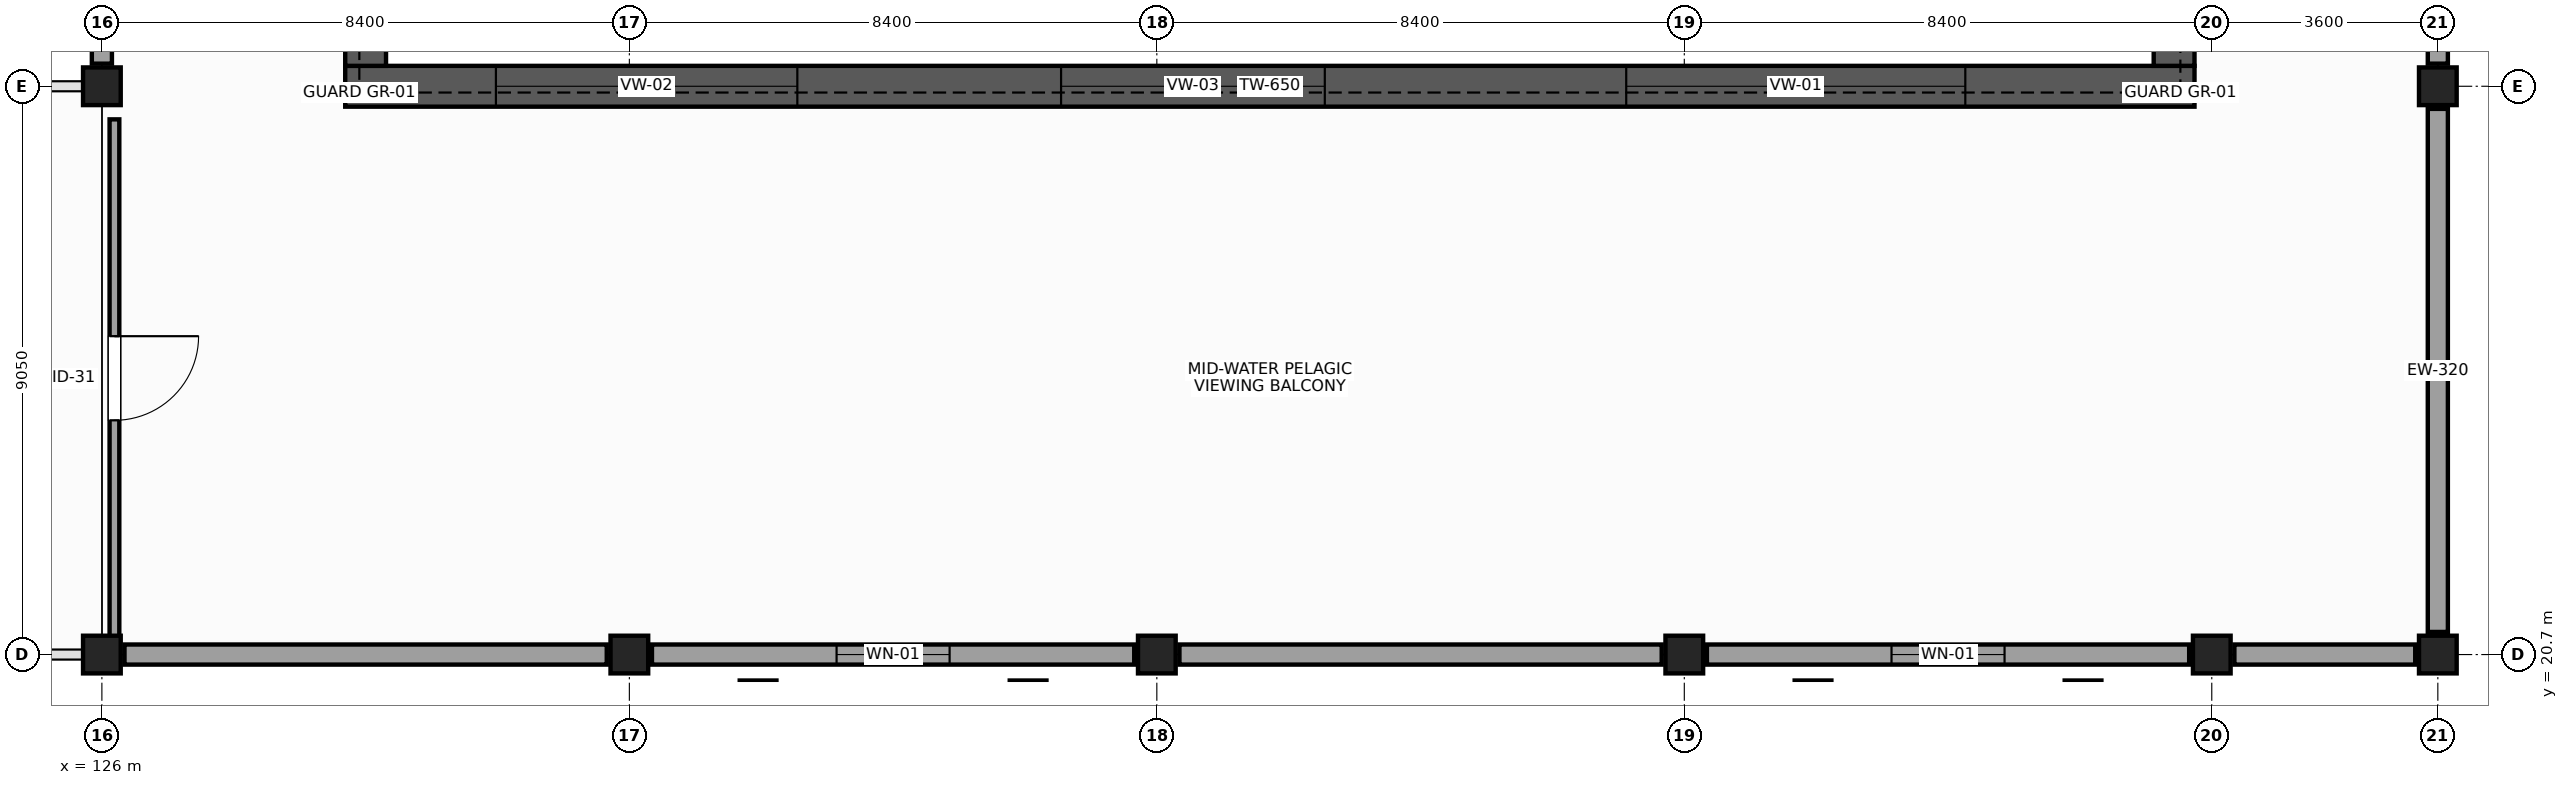
"""IFC4 building model, lengths in metres.
Left out: names, types, materials, properties, quantities, classifications, styles, units other than length and angle.
Written with IfcOpenShell. Run it as: python <this file> out.ifc"""

import sys

from ifc_helpers import new_model, si_unit, direction, frame, frame_2d, origin, origin_2d, place, context, subcontext, project, spatial, rectangle, extrude, element, fill, save


model = new_model("IFC4")
c1 = context("Model", 3, precision=1e-05, world=origin(), true_north=direction((0.0, 1.0)))
c2 = subcontext(c1, "Body", "Model", "MODEL_VIEW")
j1 = project(units=[si_unit("LENGTHUNIT", "METRE"), si_unit("PLANEANGLEUNIT", "RADIAN")], contexts=[c1])
p1 = place(None, origin())
s1 = spatial("IfcSite", under=j1, at=p1, CompositionType="ELEMENT")
p2 = place(p1, origin())
s2 = spatial("IfcBuilding", under=s1, at=p2, CompositionType="ELEMENT")
p3 = place(p2, frame((0.0, 0.0, 5.4)))
s3 = spatial("IfcBuildingStorey", under=s2, at=p3, CompositionType="ELEMENT", Elevation=5.4)
for number, where, z_axis, x_axis in (
    (1, (126.0, 20.7, 0.0), (0.0, 0.0, 1.0), (1.0, 0.0, 0.0)),
    (2, (126.0, 29.75, 0.0), (0.0, 0.0, 1.0), (1.0, 0.0, 0.0)),
    (3, (134.4, 20.7, 0.0), (0.0, 0.0, 1.0), (1.0, 0.0, 0.0)),
    (4, (142.8, 20.7, 0.0), (0.0, 0.0, 1.0), (1.0, 0.0, 0.0)),
    (5, (151.2, 20.7, 0.0), (0.0, 0.0, 1.0), (1.0, 0.0, 0.0)),
    (6, (159.6, 20.7, 0.0), (0.0, 0.0, 1.0), (1.0, 0.0, 0.0)),
    (7, (163.2, 20.7, 0.0), (0.0, 0.0, 1.0), (1.0, 0.0, 0.0)),
    (8, (163.2, 29.75, 0.0), (0.0, 0.0, 1.0), (1.0, 0.0, 0.0)),
):
    element("IfcColumn", number, at=place(p3, frame(where, z_axis=z_axis, x_axis=x_axis)), inside=s3, PredefinedType="COLUMN", context=c2, shape_type="SweptSolid", body=[
        extrude(rectangle(XDim=0.6, YDim=0.6, at=origin_2d()), origin(), (0.0, 0.0, 1.0), 5.4),
    ])
p4 = place(p3, frame((129.875, 29.75, 0.0), z_axis=(0.0, 0.0, 1.0), x_axis=(1.0, 0.0, 0.0)))
e9 = element("IfcWall", 9, at=p4, inside=s3, PredefinedType="SOLIDWALL", context=c2, shape_type="SweptSolid", body=[
    extrude(rectangle(XDim=29.45, YDim=0.65, at=frame_2d((14.725, 0.0))), origin(), (0.0, 0.0, 1.0), 5.1),
])
p5 = place(p4, frame((2.4, 0.0, 0.7)))
e10 = element("IfcOpeningElement", 10, at=p5, cuts=e9, PredefinedType="OPENING", context=c2, shape_type="SweptSolid", body=[
    extrude(rectangle(XDim=4.8, YDim=3.4, at=frame_2d((2.4, 1.7))), frame((0.0, 0.335, 0.0), z_axis=(0.0, -1.0, 0.0), x_axis=(1.0, 0.0, 0.0)), (0.0, 0.0, 1.0), 0.67),
])
p6 = place(p4, frame((11.4, 0.0, 0.7)))
e11 = element("IfcOpeningElement", 11, at=p6, cuts=e9, PredefinedType="OPENING", context=c2, shape_type="SweptSolid", body=[
    extrude(rectangle(XDim=4.2, YDim=3.2, at=frame_2d((2.1, 1.6))), frame((0.0, 0.335, 0.0), z_axis=(0.0, -1.0, 0.0), x_axis=(1.0, 0.0, 0.0)), (0.0, 0.0, 1.0), 0.67),
])
p7 = place(p4, frame((20.4, 0.0, 0.7)))
e12 = element("IfcOpeningElement", 12, at=p7, cuts=e9, PredefinedType="OPENING", context=c2, shape_type="SweptSolid", body=[
    extrude(rectangle(XDim=5.4, YDim=3.6, at=frame_2d((2.7, 1.8))), frame((0.0, 0.335, 0.0), z_axis=(0.0, -1.0, 0.0), x_axis=(1.0, 0.0, 0.0)), (0.0, 0.0, 1.0), 0.67),
])
p8 = place(p3, frame((130.2, 30.075, 0.0), z_axis=(0.0, 0.0, 1.0), x_axis=(0.0, 1.0, 0.0)))
e13 = element("IfcWall", 13, at=p8, inside=s3, PredefinedType="SOLIDWALL", context=c2, shape_type="SweptSolid", body=[
    extrude(rectangle(XDim=35.55, YDim=0.65, at=frame_2d((17.775, 0.0))), origin(), (0.0, 0.0, 1.0), 5.1),
])
p9 = place(p8, frame((2.4, 0.0, 0.7)))
e14 = element("IfcOpeningElement", 14, at=p9, cuts=e13, PredefinedType="OPENING", context=c2, shape_type="SweptSolid", body=[
    extrude(rectangle(XDim=4.8, YDim=3.4, at=frame_2d((2.4, 1.7))), frame((0.0, 0.335, 0.0), z_axis=(0.0, -1.0, 0.0), x_axis=(1.0, 0.0, 0.0)), (0.0, 0.0, 1.0), 0.67),
])
p10 = place(p8, frame((11.4, 0.0, 0.7)))
e15 = element("IfcOpeningElement", 15, at=p10, cuts=e13, PredefinedType="OPENING", context=c2, shape_type="SweptSolid", body=[
    extrude(rectangle(XDim=4.2, YDim=3.2, at=frame_2d((2.1, 1.6))), frame((0.0, 0.335, 0.0), z_axis=(0.0, -1.0, 0.0), x_axis=(1.0, 0.0, 0.0)), (0.0, 0.0, 1.0), 0.67),
])
p11 = place(p8, frame((20.4, 0.0, 0.7)))
e16 = element("IfcOpeningElement", 16, at=p11, cuts=e13, PredefinedType="OPENING", context=c2, shape_type="SweptSolid", body=[
    extrude(rectangle(XDim=5.4, YDim=3.6, at=frame_2d((2.7, 1.8))), frame((0.0, 0.335, 0.0), z_axis=(0.0, -1.0, 0.0), x_axis=(1.0, 0.0, 0.0)), (0.0, 0.0, 1.0), 0.67),
])
p12 = place(p3, frame((159.0, 30.075, 0.0), z_axis=(0.0, 0.0, 1.0), x_axis=(0.0, 1.0, 0.0)))
e17 = element("IfcWall", 17, at=p12, inside=s3, PredefinedType="SOLIDWALL", context=c2, shape_type="SweptSolid", body=[
    extrude(rectangle(XDim=35.55, YDim=0.65, at=frame_2d((17.775, 0.0))), origin(), (0.0, 0.0, 1.0), 5.1),
])
p13 = place(p12, frame((2.4, 0.0, 0.7)))
e18 = element("IfcOpeningElement", 18, at=p13, cuts=e17, PredefinedType="OPENING", context=c2, shape_type="SweptSolid", body=[
    extrude(rectangle(XDim=4.8, YDim=3.4, at=frame_2d((2.4, 1.7))), frame((0.0, 0.335, 0.0), z_axis=(0.0, -1.0, 0.0), x_axis=(1.0, 0.0, 0.0)), (0.0, 0.0, 1.0), 0.67),
])
p14 = place(p12, frame((11.4, 0.0, 0.7)))
e19 = element("IfcOpeningElement", 19, at=p14, cuts=e17, PredefinedType="OPENING", context=c2, shape_type="SweptSolid", body=[
    extrude(rectangle(XDim=4.2, YDim=3.2, at=frame_2d((2.1, 1.6))), frame((0.0, 0.335, 0.0), z_axis=(0.0, -1.0, 0.0), x_axis=(1.0, 0.0, 0.0)), (0.0, 0.0, 1.0), 0.67),
])
p15 = place(p12, frame((20.4, 0.0, 0.7)))
e20 = element("IfcOpeningElement", 20, at=p15, cuts=e17, PredefinedType="OPENING", context=c2, shape_type="SweptSolid", body=[
    extrude(rectangle(XDim=5.4, YDim=3.6, at=frame_2d((2.7, 1.8))), frame((0.0, 0.335, 0.0), z_axis=(0.0, -1.0, 0.0), x_axis=(1.0, 0.0, 0.0)), (0.0, 0.0, 1.0), 0.67),
])
p16 = place(p3, frame((163.2, 21.06, 0.0), z_axis=(0.0, 0.0, 1.0), x_axis=(0.0, 1.0, 0.0)))
e21 = element("IfcWall", 21, at=p16, inside=s3, PredefinedType="STANDARD", context=c2, shape_type="SweptSolid", body=[
    extrude(rectangle(XDim=8.33, YDim=0.32, at=frame_2d((4.165, 0.0))), origin(), (0.0, 0.0, 1.0), 4.55),
])
p17 = place(p3, frame((163.2, 30.11, 0.0), z_axis=(0.0, 0.0, 1.0), x_axis=(0.0, 1.0, 0.0)))
e22 = element("IfcWall", 22, at=p17, inside=s3, PredefinedType="STANDARD", context=c2, shape_type="SweptSolid", body=[
    extrude(rectangle(XDim=8.33, YDim=0.32, at=frame_2d((4.165, 0.0))), origin(), (0.0, 0.0, 1.0), 4.55),
])
p18 = place(p17, frame((3.265, 0.0, 1.05)))
e23 = element("IfcOpeningElement", 23, at=p18, cuts=e22, PredefinedType="OPENING", context=c2, shape_type="SweptSolid", body=[
    extrude(rectangle(XDim=1.8, YDim=2.4, at=frame_2d((0.9, 1.2))), frame((0.0, 0.17, 0.0), z_axis=(0.0, -1.0, 0.0), x_axis=(1.0, 0.0, 0.0)), (0.0, 0.0, 1.0), 0.34),
])
p19 = place(p3, frame((126.36, 20.7, 0.0), z_axis=(0.0, 0.0, 1.0), x_axis=(1.0, 0.0, 0.0)))
e24 = element("IfcWall", 24, at=p19, inside=s3, PredefinedType="STANDARD", context=c2, shape_type="SweptSolid", body=[
    extrude(rectangle(XDim=7.68, YDim=0.32, at=frame_2d((3.84, 0.0))), origin(), (0.0, 0.0, 1.0), 4.23),
])
p20 = place(p3, frame((134.76, 20.7, 0.0), z_axis=(0.0, 0.0, 1.0), x_axis=(1.0, 0.0, 0.0)))
e25 = element("IfcWall", 25, at=p20, inside=s3, PredefinedType="STANDARD", context=c2, shape_type="SweptSolid", body=[
    extrude(rectangle(XDim=7.68, YDim=0.32, at=frame_2d((3.84, 0.0))), origin(), (0.0, 0.0, 1.0), 4.55),
])
p21 = place(p20, frame((2.94, 0.0, 1.05)))
e26 = element("IfcOpeningElement", 26, at=p21, cuts=e25, PredefinedType="OPENING", context=c2, shape_type="SweptSolid", body=[
    extrude(rectangle(XDim=1.8, YDim=2.4, at=frame_2d((0.9, 1.2))), frame((0.0, 0.17, 0.0), z_axis=(0.0, -1.0, 0.0), x_axis=(1.0, 0.0, 0.0)), (0.0, 0.0, 1.0), 0.34),
])
p22 = place(p3, frame((143.16, 20.7, 0.0), z_axis=(0.0, 0.0, 1.0), x_axis=(1.0, 0.0, 0.0)))
e27 = element("IfcWall", 27, at=p22, inside=s3, PredefinedType="STANDARD", context=c2, shape_type="SweptSolid", body=[
    extrude(rectangle(XDim=7.68, YDim=0.32, at=frame_2d((3.84, 0.0))), origin(), (0.0, 0.0, 1.0), 4.55),
])
p23 = place(p3, frame((151.56, 20.7, 0.0), z_axis=(0.0, 0.0, 1.0), x_axis=(1.0, 0.0, 0.0)))
e28 = element("IfcWall", 28, at=p23, inside=s3, PredefinedType="STANDARD", context=c2, shape_type="SweptSolid", body=[
    extrude(rectangle(XDim=7.68, YDim=0.32, at=frame_2d((3.84, 0.0))), origin(), (0.0, 0.0, 1.0), 4.55),
])
p24 = place(p23, frame((2.94, 0.0, 1.05)))
e29 = element("IfcOpeningElement", 29, at=p24, cuts=e28, PredefinedType="OPENING", context=c2, shape_type="SweptSolid", body=[
    extrude(rectangle(XDim=1.8, YDim=2.4, at=frame_2d((0.9, 1.2))), frame((0.0, 0.17, 0.0), z_axis=(0.0, -1.0, 0.0), x_axis=(1.0, 0.0, 0.0)), (0.0, 0.0, 1.0), 0.34),
])
p25 = place(p3, frame((159.96, 20.7, 0.0), z_axis=(0.0, 0.0, 1.0), x_axis=(1.0, 0.0, 0.0)))
e30 = element("IfcWall", 30, at=p25, inside=s3, PredefinedType="STANDARD", context=c2, shape_type="SweptSolid", body=[
    extrude(rectangle(XDim=2.88, YDim=0.32, at=frame_2d((1.44, 0.0))), origin(), (0.0, 0.0, 1.0), 4.55),
])
p26 = place(p3, frame((126.0, 38.44, 0.0), z_axis=(0.0, 0.0, 1.0), x_axis=(0.0, -1.0, 0.0)))
e31 = element("IfcWall", 31, at=p26, inside=s3, PredefinedType="STANDARD", context=c2, shape_type="SweptSolid", body=[
    extrude(rectangle(XDim=8.33, YDim=0.32, at=frame_2d((4.165, 0.0))), origin(), (0.0, 0.0, 1.0), 4.25),
])
p27 = place(p3, frame((126.2, 20.977, 0.0), z_axis=(0.0, 0.0, 1.0), x_axis=(0.0, 1.0, 0.0)))
e32 = element("IfcWall", 32, at=p27, inside=s3, PredefinedType="PARTITIONING", context=c2, shape_type="SweptSolid", body=[
    extrude(rectangle(XDim=8.246, YDim=0.155, at=frame_2d((4.123, 0.0))), origin(), (0.0, 0.0, 1.0), 4.23),
])
p28 = place(p27, frame((3.453, 0.0, 0.0)))
e33 = element("IfcOpeningElement", 33, at=p28, cuts=e32, PredefinedType="OPENING", context=c2, shape_type="SweptSolid", body=[
    extrude(rectangle(XDim=1.34, YDim=2.32, at=frame_2d((0.67, 1.16))), frame((0.0, 0.087, 0.0), z_axis=(0.0, -1.0, 0.0), x_axis=(1.0, 0.0, 0.0)), (0.0, 0.0, 1.0), 0.175),
])
p29 = place(p21, origin())
e34 = element("IfcWindow", 34, at=p29, inside=s3, PartitioningType="SINGLE_PANEL", PredefinedType="WINDOW", context=c2, shape_type="SweptSolid", body=[
    extrude(rectangle(XDim=1.8, YDim=2.4, at=frame_2d((0.9, 1.2))), frame((0.0, 0.03, 0.0), z_axis=(0.0, -1.0, 0.0), x_axis=(1.0, 0.0, 0.0)), (0.0, 0.0, 1.0), 0.06),
])
fill(e26, e34)
p30 = place(p24, origin())
e35 = element("IfcWindow", 35, at=p30, inside=s3, PartitioningType="SINGLE_PANEL", PredefinedType="WINDOW", context=c2, shape_type="SweptSolid", body=[
    extrude(rectangle(XDim=1.8, YDim=2.4, at=frame_2d((0.9, 1.2))), frame((0.0, 0.03, 0.0), z_axis=(0.0, -1.0, 0.0), x_axis=(1.0, 0.0, 0.0)), (0.0, 0.0, 1.0), 0.06),
])
fill(e29, e35)
p31 = place(p5, origin())
e36 = element("IfcWindow", 36, at=p31, inside=s3, PartitioningType="SINGLE_PANEL", PredefinedType="WINDOW", context=c2, shape_type="SweptSolid", body=[
    extrude(rectangle(XDim=4.8, YDim=3.4, at=frame_2d((2.4, 1.7))), frame((0.0, 0.11, 0.0), z_axis=(0.0, -1.0, 0.0), x_axis=(1.0, 0.0, 0.0)), (0.0, 0.0, 1.0), 0.22),
])
fill(e10, e36)
p32 = place(p6, origin())
e37 = element("IfcWindow", 37, at=p32, inside=s3, PartitioningType="SINGLE_PANEL", PredefinedType="WINDOW", context=c2, shape_type="SweptSolid", body=[
    extrude(rectangle(XDim=4.2, YDim=3.2, at=frame_2d((2.1, 1.6))), frame((0.0, 0.1, 0.0), z_axis=(0.0, -1.0, 0.0), x_axis=(1.0, 0.0, 0.0)), (0.0, 0.0, 1.0), 0.2),
])
fill(e11, e37)
p33 = place(p7, origin())
e38 = element("IfcWindow", 38, at=p33, inside=s3, PartitioningType="SINGLE_PANEL", PredefinedType="WINDOW", context=c2, shape_type="SweptSolid", body=[
    extrude(rectangle(XDim=5.4, YDim=3.6, at=frame_2d((2.7, 1.8))), frame((0.0, 0.12, 0.0), z_axis=(0.0, -1.0, 0.0), x_axis=(1.0, 0.0, 0.0)), (0.0, 0.0, 1.0), 0.24),
])
fill(e12, e38)
p34 = place(p28, frame((1.34, 0.0, 0.0), z_axis=(0.0, 0.0, 1.0), x_axis=(-1.0, 0.0, 0.0)))
e39 = element("IfcDoor", 39, at=p34, inside=s3, OperationType="SINGLE_SWING_LEFT", PredefinedType="DOOR", context=c2, shape_type="SweptSolid", body=[
    extrude(rectangle(XDim=1.34, YDim=2.32, at=frame_2d((0.67, 1.16))), frame((0.0, 0.025, 0.0), z_axis=(0.0, -1.0, 0.0), x_axis=(1.0, 0.0, 0.0)), (0.0, 0.0, 1.0), 0.05),
])
fill(e33, e39)
save(model, sys.argv[1])
